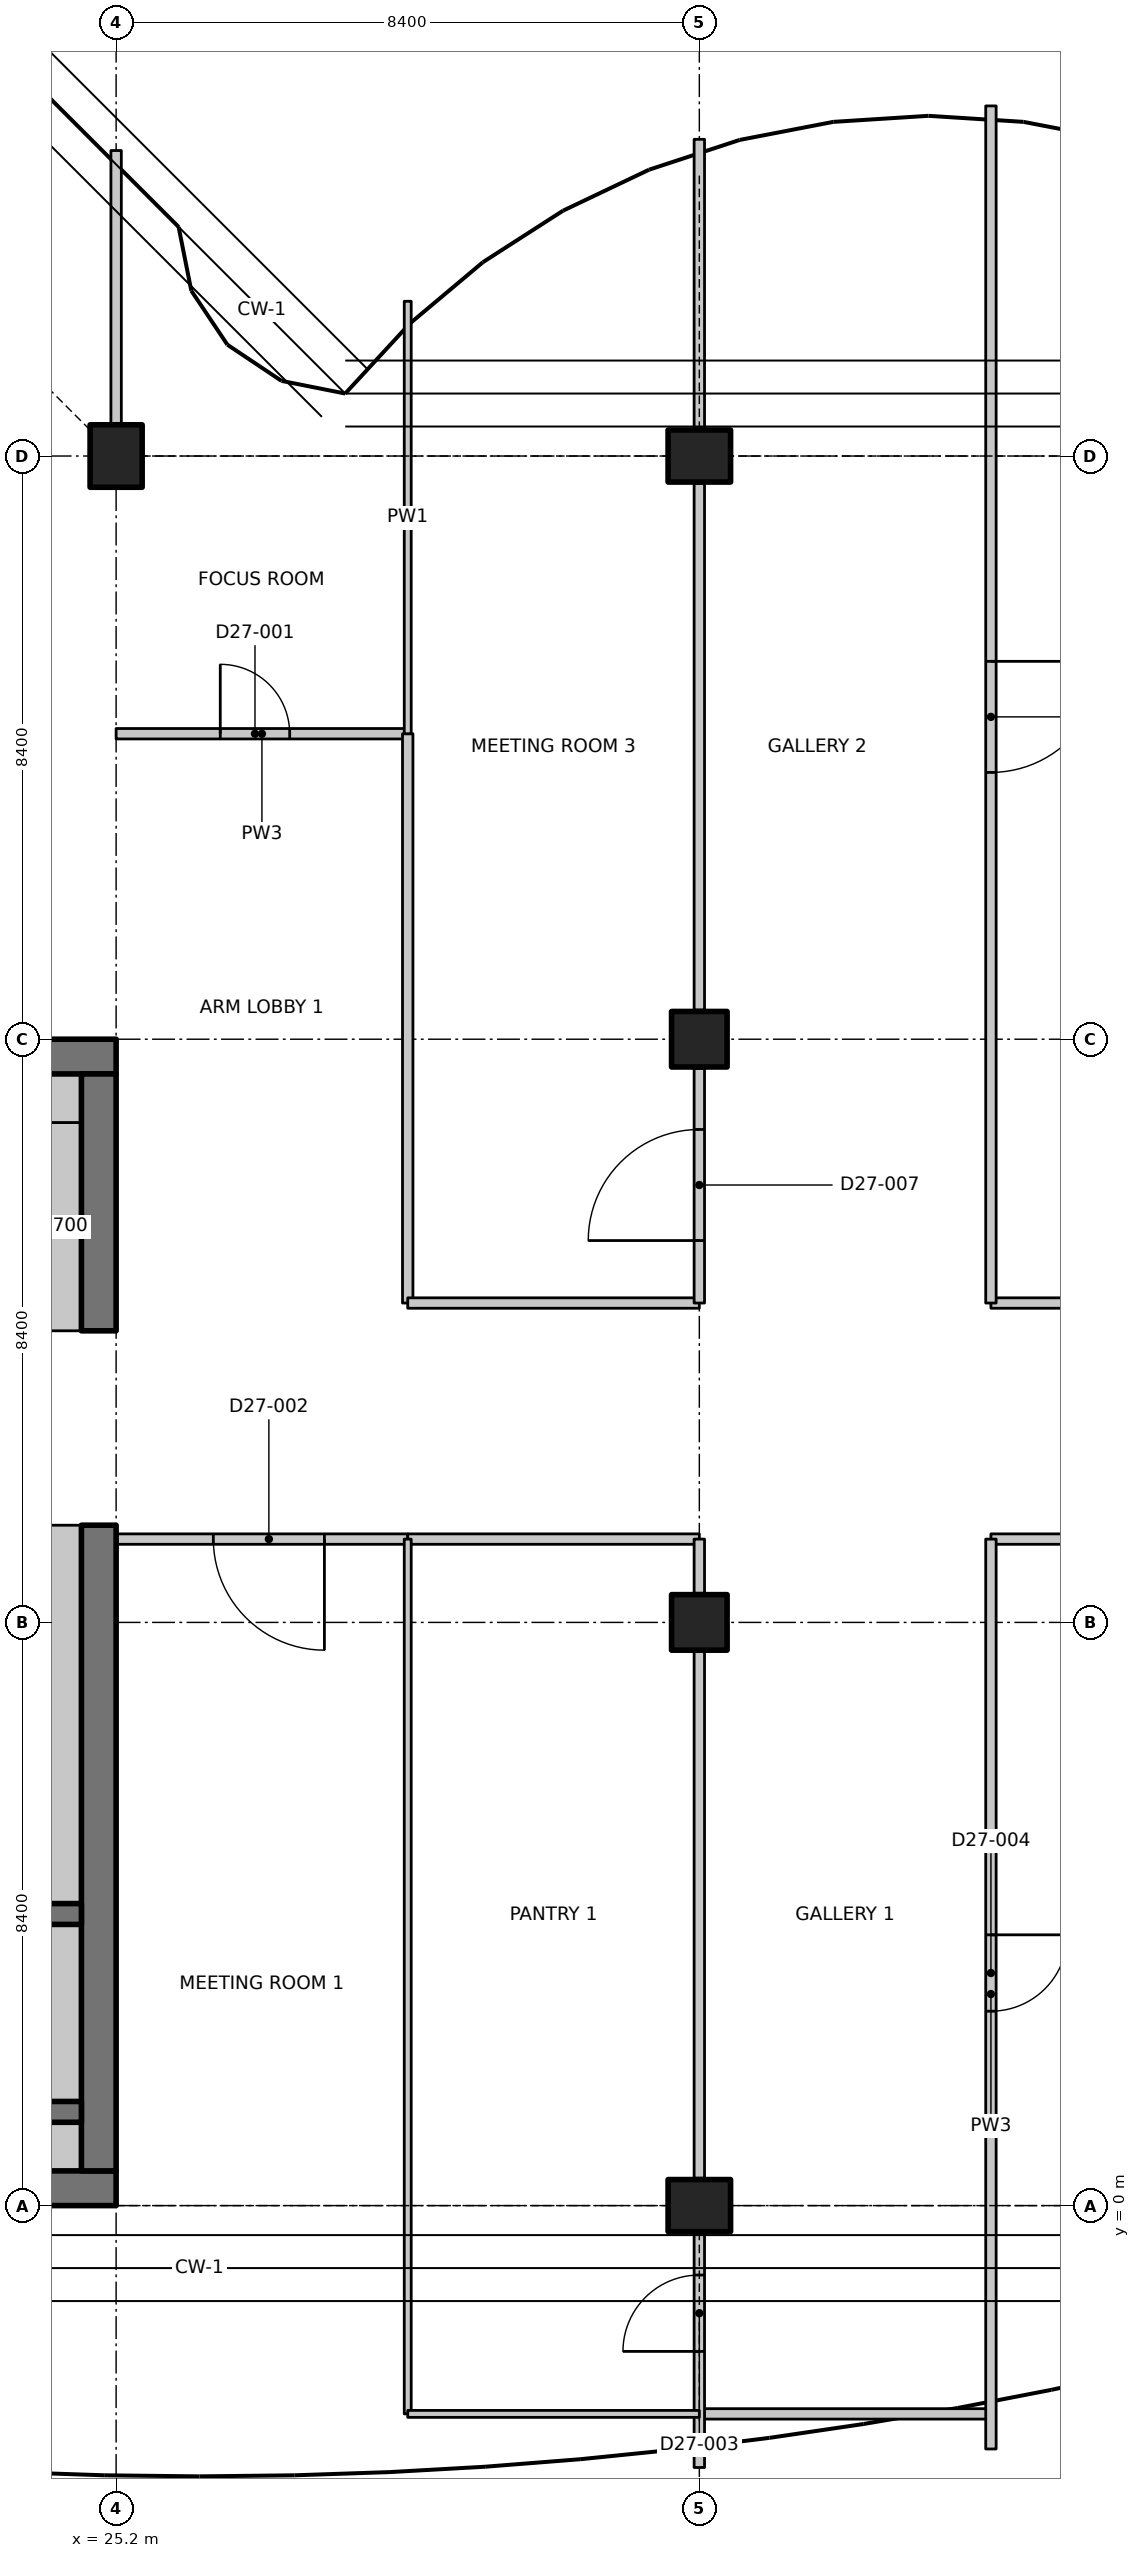
"""IFC4 building model, lengths in metres.
Left out: names, types, materials, properties, quantities, classifications, styles, units other than length and angle.
Written with IfcOpenShell. Run it as: python <this file> out.ifc"""

import sys

from ifc_helpers import new_model, si_unit, direction, frame, frame_2d, origin, origin_2d, place, context, subcontext, project, spatial, polyline, rectangle, outline, extrude, element, fill, save


model = new_model("IFC4")
c1 = context("Model", 3, precision=1e-05, world=origin(), true_north=direction((0.0, 1.0)))
c2 = subcontext(c1, "Body", "Model", "MODEL_VIEW")
j1 = project(units=[si_unit("LENGTHUNIT", "METRE"), si_unit("PLANEANGLEUNIT", "RADIAN")], contexts=[c1])
p1 = place(None, origin())
s1 = spatial("IfcSite", under=j1, at=p1, CompositionType="ELEMENT")
p2 = place(p1, origin())
s2 = spatial("IfcBuilding", under=s1, at=p2, CompositionType="ELEMENT")
p3 = place(p2, frame((0.0, 0.0, 215.7)))
s3 = spatial("IfcBuildingStorey", under=s2, at=p3, CompositionType="ELEMENT", Elevation=215.7)
for number, where, z_axis, x_axis in (
    (1, (25.2, 25.2, 0.0), (0.0, 0.0, 1.0), (1.0, 0.0, 0.0)),
    (2, (33.6, 0.0, 0.0), (0.0, 0.0, 1.0), (0.0, 1.0, 0.0)),
):
    element("IfcColumn", number, at=place(p3, frame(where, z_axis=z_axis, x_axis=x_axis)), inside=s3, PredefinedType="COLUMN", context=c2, shape_type="SweptSolid", body=[
        extrude(rectangle(XDim=0.75, YDim=0.9, at=origin_2d()), origin(), (0.0, 0.0, 1.0), 3.35),
    ])
for number, where, z_axis, x_axis in (
    (3, (33.6, 8.4, 0.0), (0.0, 0.0, 1.0), (1.0, 0.0, 0.0)),
    (4, (33.6, 16.8, 0.0), (0.0, 0.0, 1.0), (1.0, 0.0, 0.0)),
):
    element("IfcColumn", number, at=place(p3, frame(where, z_axis=z_axis, x_axis=x_axis)), inside=s3, PredefinedType="COLUMN", context=c2, shape_type="SweptSolid", body=[
        extrude(rectangle(XDim=0.8, YDim=0.8, at=origin_2d()), origin(), (0.0, 0.0, 1.0), 3.35),
    ])
p4 = place(p3, frame((33.6, 25.2, 0.0), z_axis=(0.0, 0.0, 1.0), x_axis=(0.0, 1.0, 0.0)))
e5 = element("IfcColumn", 5, at=p4, inside=s3, PredefinedType="COLUMN", context=c2, shape_type="SweptSolid", body=[
    extrude(rectangle(XDim=0.75, YDim=0.9, at=origin_2d()), origin(), (0.0, 0.0, 1.0), 3.35),
])
p5 = place(p3, frame((7.436, 0.25, 0.0), z_axis=(0.0, 0.0, 1.0), x_axis=(1.0, 0.0, 0.0)))
e6 = element("IfcWall", 6, at=p5, inside=s3, PredefinedType="SHEAR", context=c2, shape_type="SweptSolid", body=[
    extrude(rectangle(XDim=17.764, YDim=0.5, at=frame_2d((8.882, 0.0))), origin(), (0.0, 0.0, 1.0), 3.35),
])
p6 = place(p3, frame((23.8, 16.55, 0.0), z_axis=(0.0, 0.0, 1.0), x_axis=(1.0, 0.0, 0.0)))
e7 = element("IfcWall", 7, at=p6, inside=s3, PredefinedType="SHEAR", context=c2, shape_type="SweptSolid", body=[
    extrude(rectangle(XDim=1.4, YDim=0.5, at=frame_2d((0.7, 0.0))), origin(), (0.0, 0.0, 1.0), 3.35),
])
p7 = place(p3, frame((24.95, 0.5, 0.0), z_axis=(0.0, 0.0, 1.0), x_axis=(0.0, 1.0, 0.0)))
e8 = element("IfcWall", 8, at=p7, inside=s3, PredefinedType="SHEAR", context=c2, shape_type="SweptSolid", body=[
    extrude(rectangle(XDim=9.3, YDim=0.5, at=frame_2d((4.65, 0.0))), origin(), (0.0, 0.0, 1.0), 3.35),
])
p8 = place(p3, frame((24.95, 12.6, 0.0), z_axis=(0.0, 0.0, 1.0), x_axis=(0.0, 1.0, 0.0)))
e9 = element("IfcWall", 9, at=p8, inside=s3, PredefinedType="SHEAR", context=c2, shape_type="SweptSolid", body=[
    extrude(rectangle(XDim=3.7, YDim=0.5, at=frame_2d((1.85, 0.0))), origin(), (0.0, 0.0, 1.0), 3.35),
])
p9 = place(p3, frame((24.35, 12.6, 0.0), z_axis=(0.0, 0.0, 1.0), x_axis=(0.0, 1.0, 0.0)))
e10 = element("IfcWall", 10, at=p9, inside=s3, PredefinedType="PARTITIONING", context=c2, shape_type="SweptSolid", body=[
    extrude(rectangle(XDim=3.0, YDim=0.7, at=frame_2d((1.5, 0.0))), origin(), (0.0, 0.0, 1.0), 3.35),
])
p10 = place(p3, frame((23.8, 15.95, 0.0), z_axis=(0.0, 0.0, 1.0), x_axis=(1.0, 0.0, 0.0)))
e11 = element("IfcWall", 11, at=p10, inside=s3, PredefinedType="PARTITIONING", context=c2, shape_type="SweptSolid", body=[
    extrude(rectangle(XDim=0.9, YDim=0.7, at=frame_2d((0.45, 0.0))), origin(), (0.0, 0.0, 1.0), 3.35),
])
p11 = place(p3, frame((15.8, 1.35, 0.0), z_axis=(0.0, 0.0, 1.0), x_axis=(1.0, 0.0, 0.0)))
e12 = element("IfcWall", 12, at=p11, inside=s3, PredefinedType="SHEAR", context=c2, shape_type="SweptSolid", body=[
    extrude(rectangle(XDim=8.9, YDim=0.3, at=frame_2d((4.45, 0.0))), origin(), (0.0, 0.0, 1.0), 3.35),
])
p12 = place(p3, frame((15.8, 4.2, 0.0), z_axis=(0.0, 0.0, 1.0), x_axis=(1.0, 0.0, 0.0)))
e13 = element("IfcWall", 13, at=p12, inside=s3, PredefinedType="SHEAR", context=c2, shape_type="SweptSolid", body=[
    extrude(rectangle(XDim=8.9, YDim=0.3, at=frame_2d((4.45, 0.0))), origin(), (0.0, 0.0, 1.0), 3.35),
])
p13 = place(p12, frame((0.4, 0.0, 0.0)))
e14 = element("IfcOpeningElement", 14, at=p13, cuts=e13, PredefinedType="OPENING", context=c2, shape_type="SweptSolid", body=[
    extrude(rectangle(XDim=1.0, YDim=2.1, at=frame_2d((0.5, 1.05))), frame((0.0, 0.16, 0.0), z_axis=(0.0, -1.0, 0.0), x_axis=(1.0, 0.0, 0.0)), (0.0, 0.0, 1.0), 0.32),
])
p14 = place(p3, frame((13.35, 0.85, 0.0), z_axis=(0.0, 0.0, 1.0), x_axis=(1.0, 0.0, 0.0)))
e15 = element("IfcWall", 15, at=p14, inside=s3, PredefinedType="PARTITIONING", context=c2, shape_type="SweptSolid", body=[
    extrude(rectangle(XDim=11.35, YDim=0.7, at=frame_2d((5.675, 0.0))), origin(), (0.0, 0.0, 1.0), 3.35),
])
p15 = place(p3, frame((24.35, 1.5, 0.0), z_axis=(0.0, 0.0, 1.0), x_axis=(0.0, 1.0, 0.0)))
e16 = element("IfcWall", 16, at=p15, inside=s3, PredefinedType="PARTITIONING", context=c2, shape_type="SweptSolid", body=[
    extrude(rectangle(XDim=2.55, YDim=0.7, at=frame_2d((1.275, 0.0))), origin(), (0.0, 0.0, 1.0), 3.35),
])
p16 = place(p3, frame((24.35, 4.35, 0.0), z_axis=(0.0, 0.0, 1.0), x_axis=(0.0, 1.0, 0.0)))
e17 = element("IfcWall", 17, at=p16, inside=s3, PredefinedType="PARTITIONING", context=c2, shape_type="SweptSolid", body=[
    extrude(rectangle(XDim=5.45, YDim=0.7, at=frame_2d((2.725, 0.0))), origin(), (0.0, 0.0, 1.0), 3.35),
])
p17 = place(p3, frame((25.2, 21.2, 0.0), z_axis=(0.0, 0.0, 1.0), x_axis=(1.0, 0.0, 0.0)))
e18 = element("IfcWall", 18, at=p17, inside=s3, PredefinedType="PARTITIONING", context=c2, shape_type="SweptSolid", body=[
    extrude(rectangle(XDim=4.2, YDim=0.15, at=frame_2d((2.1, 0.0))), origin(), (0.0, 0.0, 1.0), 3.33),
])
p18 = place(p17, frame((1.5, 0.0, 0.0)))
e19 = element("IfcOpeningElement", 19, at=p18, cuts=e18, PredefinedType="OPENING", context=c2, shape_type="SweptSolid", body=[
    extrude(rectangle(XDim=1.0, YDim=2.1, at=frame_2d((0.5, 1.05))), frame((0.0, 0.085, 0.0), z_axis=(0.0, -1.0, 0.0), x_axis=(1.0, 0.0, 0.0)), (0.0, 0.0, 1.0), 0.17),
])
p19 = place(p3, frame((29.4, 9.6, 0.0), z_axis=(0.0, 0.0, 1.0), x_axis=(-1.0, 0.0, 0.0)))
e20 = element("IfcWall", 20, at=p19, inside=s3, PredefinedType="PARTITIONING", context=c2, shape_type="SweptSolid", body=[
    extrude(rectangle(XDim=4.2, YDim=0.15, at=frame_2d((2.1, 0.0))), origin(), (0.0, 0.0, 1.0), 3.33),
])
p20 = place(p19, frame((1.2, 0.0, 0.0)))
e21 = element("IfcOpeningElement", 21, at=p20, cuts=e20, PredefinedType="OPENING", context=c2, shape_type="SweptSolid", body=[
    extrude(rectangle(XDim=1.6, YDim=2.1, at=frame_2d((0.8, 1.05))), frame((0.0, 0.085, 0.0), z_axis=(0.0, -1.0, 0.0), x_axis=(1.0, 0.0, 0.0)), (0.0, 0.0, 1.0), 0.17),
])
p21 = place(p3, frame((29.4, 21.2, 0.0), z_axis=(0.0, 0.0, 1.0), x_axis=(0.0, -1.0, 0.0)))
e22 = element("IfcWall", 22, at=p21, inside=s3, PredefinedType="PARTITIONING", context=c2, shape_type="SweptSolid", body=[
    extrude(rectangle(XDim=8.2, YDim=0.15, at=frame_2d((4.1, 0.0))), origin(), (0.0, 0.0, 1.0), 3.33),
])
p22 = place(p3, frame((29.4, 27.429, 0.0), z_axis=(0.0, 0.0, 1.0), x_axis=(0.0, -1.0, 0.0)))
e23 = element("IfcWall", 23, at=p22, inside=s3, PredefinedType="PARTITIONING", context=c2, shape_type="SweptSolid", body=[
    extrude(outline(polyline([(0.0, 0.0), (6.229, 0.0), (6.229, 3.33), (2.679, 3.33), (2.677, 2.98), (1.781, 2.98), (1.779, 3.33), (0.154, 3.33), (0.0, 3.33), (0.0, 0.0)])), frame((0.0, 0.05, 0.0), z_axis=(0.0, -1.0, 0.0), x_axis=(1.0, 0.0, 0.0)), (0.0, 0.0, 1.0), 0.1),
])
p23 = place(p3, frame((25.2, 25.67, 0.0), z_axis=(0.0, 0.0, 1.0), x_axis=(0.0, 1.0, 0.0)))
e24 = element("IfcWall", 24, at=p23, inside=s3, PredefinedType="PARTITIONING", context=c2, shape_type="SweptSolid", body=[
    extrude(rectangle(XDim=3.93, YDim=0.15, at=frame_2d((1.965, 0.0))), origin(), (0.0, 0.0, 1.0), 2.98),
])
p24 = place(p3, frame((33.6, 9.6, 0.0), z_axis=(0.0, 0.0, 1.0), x_axis=(-1.0, 0.0, 0.0)))
e25 = element("IfcWall", 25, at=p24, inside=s3, PredefinedType="PARTITIONING", context=c2, shape_type="SweptSolid", body=[
    extrude(rectangle(XDim=4.2, YDim=0.15, at=frame_2d((2.1, 0.0))), origin(), (0.0, 0.0, 1.0), 3.33),
])
p25 = place(p3, frame((42.0, 9.6, 0.0), z_axis=(0.0, 0.0, 1.0), x_axis=(-1.0, 0.0, 0.0)))
e26 = element("IfcWall", 26, at=p25, inside=s3, PredefinedType="PARTITIONING", context=c2, shape_type="SweptSolid", body=[
    extrude(rectangle(XDim=4.2, YDim=0.15, at=frame_2d((2.1, 0.0))), origin(), (0.0, 0.0, 1.0), 3.33),
])
p26 = place(p3, frame((29.4, 13.0, 0.0), z_axis=(0.0, 0.0, 1.0), x_axis=(1.0, 0.0, 0.0)))
e27 = element("IfcWall", 27, at=p26, inside=s3, PredefinedType="PARTITIONING", context=c2, shape_type="SweptSolid", body=[
    extrude(rectangle(XDim=4.2, YDim=0.15, at=frame_2d((2.1, 0.0))), origin(), (0.0, 0.0, 1.0), 3.33),
])
p27 = place(p3, frame((37.8, 13.0, 0.0), z_axis=(0.0, 0.0, 1.0), x_axis=(1.0, 0.0, 0.0)))
e28 = element("IfcWall", 28, at=p27, inside=s3, PredefinedType="PARTITIONING", context=c2, shape_type="SweptSolid", body=[
    extrude(rectangle(XDim=3.4, YDim=0.15, at=frame_2d((1.7, 0.0))), origin(), (0.0, 0.0, 1.0), 3.33),
])
p28 = place(p3, frame((37.831, -3.0, 0.0), z_axis=(0.0, 0.0, 1.0), x_axis=(-1.0, 0.0, 0.0)))
e29 = element("IfcWall", 29, at=p28, inside=s3, PredefinedType="PARTITIONING", context=c2, shape_type="SweptSolid", body=[
    extrude(rectangle(XDim=4.231, YDim=0.15, at=frame_2d((2.115, 0.0))), origin(), (0.0, 0.0, 1.0), 2.98),
])
p29 = place(p3, frame((33.6, -3.772, 0.0), z_axis=(0.0, 0.0, 1.0), x_axis=(0.0, 1.0, 0.0)))
e30 = element("IfcWall", 30, at=p29, inside=s3, PredefinedType="PARTITIONING", context=c2, shape_type="SweptSolid", body=[
    extrude(rectangle(XDim=3.377, YDim=0.15, at=frame_2d((1.688, 0.0))), origin(), (0.0, 0.0, 1.0), 2.98),
])
p30 = place(p29, frame((1.672, 0.0, 0.0)))
e31 = element("IfcOpeningElement", 31, at=p30, cuts=e30, PredefinedType="OPENING", context=c2, shape_type="SweptSolid", body=[
    extrude(rectangle(XDim=1.1, YDim=2.1, at=frame_2d((0.55, 1.05))), frame((0.0, 0.085, 0.0), z_axis=(0.0, -1.0, 0.0), x_axis=(1.0, 0.0, 0.0)), (0.0, 0.0, 1.0), 0.17),
])
p31 = place(p3, frame((33.6, 0.395, 0.0), z_axis=(0.0, 0.0, 1.0), x_axis=(0.0, 1.0, 0.0)))
e32 = element("IfcWall", 32, at=p31, inside=s3, PredefinedType="PARTITIONING", context=c2, shape_type="SweptSolid", body=[
    extrude(outline(polyline([(0.0, 0.0), (7.585, 0.0), (7.585, 3.33), (0.055, 3.33), (0.053, 2.98), (0.0, 2.98), (0.0, 0.0)])), frame((0.0, 0.075, 0.0), z_axis=(0.0, -1.0, 0.0), x_axis=(1.0, 0.0, 0.0)), (0.0, 0.0, 1.0), 0.15),
])
p32 = place(p3, frame((33.6, 8.82, 0.0), z_axis=(0.0, 0.0, 1.0), x_axis=(0.0, 1.0, 0.0)))
e33 = element("IfcWall", 33, at=p32, inside=s3, PredefinedType="PARTITIONING", context=c2, shape_type="SweptSolid", body=[
    extrude(rectangle(XDim=0.78, YDim=0.15, at=frame_2d((0.39, 0.0))), origin(), (0.0, 0.0, 1.0), 3.33),
])
p33 = place(p3, frame((37.8, 9.6, 0.0), z_axis=(0.0, 0.0, 1.0), x_axis=(0.0, -1.0, 0.0)))
e34 = element("IfcWall", 34, at=p33, inside=s3, PredefinedType="PARTITIONING", context=c2, shape_type="SweptSolid", body=[
    extrude(outline(polyline([(0.0, 0.0), (13.106, 0.0), (13.105, 3.33), (12.622, 3.33), (10.05, 3.33), (10.048, 2.98), (9.152, 2.98), (9.15, 3.33), (0.0, 3.33), (0.0, 0.0)])), frame((0.0, 0.075, 0.0), z_axis=(0.0, -1.0, 0.0), x_axis=(1.0, 0.0, 0.0)), (0.0, 0.0, 1.0), 0.15),
])
p34 = place(p33, frame((5.7, 0.0, 0.0)))
e35 = element("IfcOpeningElement", 35, at=p34, cuts=e34, PredefinedType="OPENING", context=c2, shape_type="SweptSolid", body=[
    extrude(rectangle(XDim=1.1, YDim=2.1, at=frame_2d((0.55, 1.05))), frame((0.0, 0.085, 0.0), z_axis=(0.0, -1.0, 0.0), x_axis=(1.0, 0.0, 0.0)), (0.0, 0.0, 1.0), 0.17),
])
p35 = place(p3, frame((29.4, 9.6, 0.0), z_axis=(0.0, 0.0, 1.0), x_axis=(0.0, -1.0, 0.0)))
e36 = element("IfcWall", 36, at=p35, inside=s3, PredefinedType="PARTITIONING", context=c2, shape_type="SweptSolid", body=[
    extrude(outline(polyline([(0.0, 0.0), (12.6, 0.0), (12.6, 3.33), (10.05, 3.33), (10.048, 2.98), (9.152, 2.98), (9.15, 3.33), (0.0, 3.33), (0.0, 0.0)])), frame((0.0, 0.05, 0.0), z_axis=(0.0, -1.0, 0.0), x_axis=(1.0, 0.0, 0.0)), (0.0, 0.0, 1.0), 0.1),
])
p36 = place(p3, frame((29.4, -3.0, 0.0), z_axis=(0.0, 0.0, 1.0), x_axis=(1.0, 0.0, 0.0)))
e37 = element("IfcWall", 37, at=p36, inside=s3, PredefinedType="PARTITIONING", context=c2, shape_type="SweptSolid", body=[
    extrude(rectangle(XDim=4.2, YDim=0.1, at=frame_2d((2.1, 0.0))), origin(), (0.0, 0.0, 1.0), 2.98),
])
p37 = place(p3, frame((33.6, 13.0, 0.0), z_axis=(0.0, 0.0, 1.0), x_axis=(0.0, 1.0, 0.0)))
e38 = element("IfcWall", 38, at=p37, inside=s3, PredefinedType="PARTITIONING", context=c2, shape_type="SweptSolid", body=[
    extrude(rectangle(XDim=3.38, YDim=0.15, at=frame_2d((1.69, 0.0))), origin(), (0.0, 0.0, 1.0), 3.33),
])
p38 = place(p37, frame((0.9, 0.0, 0.0)))
e39 = element("IfcOpeningElement", 39, at=p38, cuts=e38, PredefinedType="OPENING", context=c2, shape_type="SweptSolid", body=[
    extrude(rectangle(XDim=1.6, YDim=2.1, at=frame_2d((0.8, 1.05))), frame((0.0, 0.085, 0.0), z_axis=(0.0, -1.0, 0.0), x_axis=(1.0, 0.0, 0.0)), (0.0, 0.0, 1.0), 0.17),
])
p39 = place(p3, frame((33.6, 17.22, 0.0), z_axis=(0.0, 0.0, 1.0), x_axis=(0.0, 1.0, 0.0)))
e40 = element("IfcWall", 40, at=p39, inside=s3, PredefinedType="PARTITIONING", context=c2, shape_type="SweptSolid", body=[
    extrude(outline(polyline([(0.0, 0.0), (7.585, 0.0), (7.585, 2.98), (7.532, 2.98), (7.53, 3.33), (0.0, 3.33), (0.0, 0.0)])), frame((0.0, 0.075, 0.0), z_axis=(0.0, -1.0, 0.0), x_axis=(1.0, 0.0, 0.0)), (0.0, 0.0, 1.0), 0.15),
])
p40 = place(p3, frame((33.6, 25.595, 0.0), z_axis=(0.0, 0.0, 1.0), x_axis=(0.0, 1.0, 0.0)))
e41 = element("IfcWall", 41, at=p40, inside=s3, PredefinedType="PARTITIONING", context=c2, shape_type="SweptSolid", body=[
    extrude(rectangle(XDim=4.167, YDim=0.15, at=frame_2d((2.083, 0.0))), origin(), (0.0, 0.0, 1.0), 2.98),
])
p41 = place(p3, frame((37.8, 30.243, 0.0), z_axis=(0.0, 0.0, 1.0), x_axis=(0.0, -1.0, 0.0)))
e42 = element("IfcWall", 42, at=p41, inside=s3, PredefinedType="PARTITIONING", context=c2, shape_type="SweptSolid", body=[
    extrude(outline(polyline([(0.0, 0.0), (17.243, 0.0), (17.243, 3.33), (5.493, 3.33), (5.491, 2.98), (4.595, 2.98), (4.593, 3.33), (0.0, 3.33), (0.0, 0.0)])), frame((0.0, 0.075, 0.0), z_axis=(0.0, -1.0, 0.0), x_axis=(1.0, 0.0, 0.0)), (0.0, 0.0, 1.0), 0.15),
])
p42 = place(p41, frame((8.0, 0.0, 0.0)))
e43 = element("IfcOpeningElement", 43, at=p42, cuts=e42, PredefinedType="OPENING", context=c2, shape_type="SweptSolid", body=[
    extrude(rectangle(XDim=1.6, YDim=2.1, at=frame_2d((0.8, 1.05))), frame((0.0, 0.085, 0.0), z_axis=(0.0, -1.0, 0.0), x_axis=(1.0, 0.0, 0.0)), (0.0, 0.0, 1.0), 0.17),
])
p43 = place(p18, origin())
e44 = element("IfcDoor", 44, at=p43, inside=s3, OperationType="SINGLE_SWING_LEFT", PredefinedType="DOOR", context=c2, shape_type="SweptSolid", body=[
    extrude(rectangle(XDim=1.0, YDim=2.1, at=frame_2d((0.5, 1.05))), frame((0.0, 0.025, 0.0), z_axis=(0.0, -1.0, 0.0), x_axis=(1.0, 0.0, 0.0)), (0.0, 0.0, 1.0), 0.05),
])
fill(e19, e44)
p44 = place(p20, origin())
e45 = element("IfcDoor", 45, at=p44, inside=s3, OperationType="DOUBLE_DOOR_SINGLE_SWING", PredefinedType="DOOR", context=c2, shape_type="SweptSolid", body=[
    extrude(rectangle(XDim=1.6, YDim=2.1, at=frame_2d((0.8, 1.05))), frame((0.0, 0.025, 0.0), z_axis=(0.0, -1.0, 0.0), x_axis=(1.0, 0.0, 0.0)), (0.0, 0.0, 1.0), 0.05),
])
fill(e21, e45)
p45 = place(p30, origin())
e46 = element("IfcDoor", 46, at=p45, inside=s3, OperationType="SINGLE_SWING_LEFT", PredefinedType="DOOR", context=c2, shape_type="SweptSolid", body=[
    extrude(rectangle(XDim=1.1, YDim=2.1, at=frame_2d((0.55, 1.05))), frame((0.0, 0.025, 0.0), z_axis=(0.0, -1.0, 0.0), x_axis=(1.0, 0.0, 0.0)), (0.0, 0.0, 1.0), 0.05),
])
fill(e31, e46)
p46 = place(p34, origin())
e47 = element("IfcDoor", 47, at=p46, inside=s3, OperationType="SINGLE_SWING_LEFT", PredefinedType="DOOR", context=c2, shape_type="SweptSolid", body=[
    extrude(rectangle(XDim=1.1, YDim=2.1, at=frame_2d((0.55, 1.05))), frame((0.0, 0.025, 0.0), z_axis=(0.0, -1.0, 0.0), x_axis=(1.0, 0.0, 0.0)), (0.0, 0.0, 1.0), 0.05),
])
fill(e35, e47)
p47 = place(p38, origin())
e48 = element("IfcDoor", 48, at=p47, inside=s3, OperationType="DOUBLE_DOOR_SINGLE_SWING", PredefinedType="DOOR", context=c2, shape_type="SweptSolid", body=[
    extrude(rectangle(XDim=1.6, YDim=2.1, at=frame_2d((0.8, 1.05))), frame((0.0, 0.025, 0.0), z_axis=(0.0, -1.0, 0.0), x_axis=(1.0, 0.0, 0.0)), (0.0, 0.0, 1.0), 0.05),
])
fill(e39, e48)
p48 = place(p42, origin())
e49 = element("IfcDoor", 49, at=p48, inside=s3, OperationType="DOUBLE_DOOR_SINGLE_SWING", PredefinedType="DOOR", context=c2, shape_type="SweptSolid", body=[
    extrude(rectangle(XDim=1.6, YDim=2.1, at=frame_2d((0.8, 1.05))), frame((0.0, 0.025, 0.0), z_axis=(0.0, -1.0, 0.0), x_axis=(1.0, 0.0, 0.0)), (0.0, 0.0, 1.0), 0.05),
])
fill(e43, e49)
save(model, sys.argv[1])
